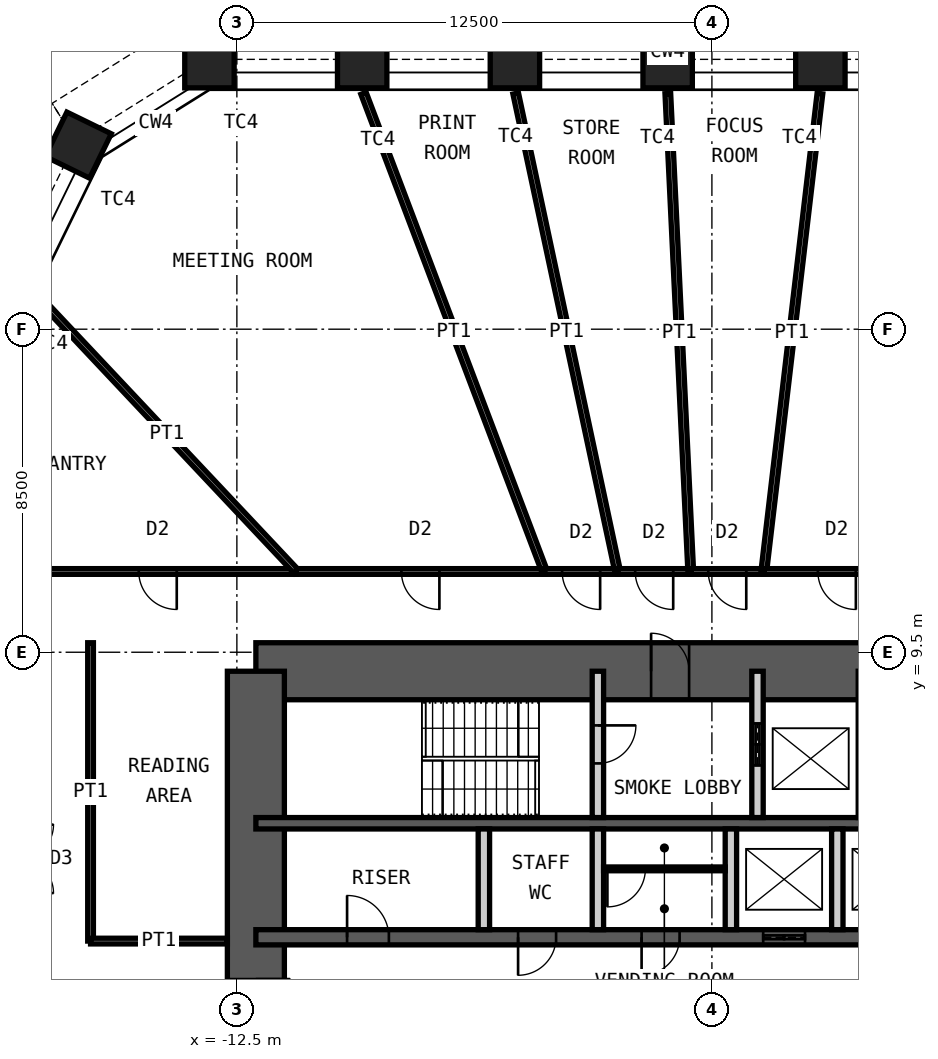
"""IFC4 building model, lengths in metres.
Left out: names, types, materials, properties, quantities, classifications, styles, units other than length and angle.
Written with IfcOpenShell. Run it as: python <this file> out.ifc"""

import sys

from ifc_helpers import new_model, si_unit, direction, frame, frame_2d, origin, origin_2d, place, context, subcontext, project, spatial, rectangle, hollow_rectangle, extrude, element, fill, save


model = new_model("IFC4")
c1 = context("Model", 3, precision=1e-05, world=origin(), true_north=direction((0.0, 1.0)))
c2 = subcontext(c1, "Body", "Model", "MODEL_VIEW")
j1 = project(units=[si_unit("LENGTHUNIT", "METRE"), si_unit("PLANEANGLEUNIT", "RADIAN")], contexts=[c1])
p1 = place(None, origin())
s1 = spatial("IfcSite", under=j1, at=p1, CompositionType="ELEMENT")
p2 = place(p1, origin())
s2 = spatial("IfcBuilding", under=s1, at=p2, CompositionType="ELEMENT")
p3 = place(p2, frame((0.0, 0.0, 140.8)))
s3 = spatial("IfcBuildingStorey", under=s2, at=p3, CompositionType="ELEMENT", Elevation=140.8)
for number, where, z_axis, x_axis in (
    (1, (-13.222, 25.0, 0.0), (0.0, 0.0, 1.0), (-1.0, 0.0, 0.0)),
    (2, (-9.203, 25.0, 0.0), (0.0, 0.0, 1.0), (-1.0, 0.0, 0.0)),
    (3, (-5.184, 25.0, 0.0), (0.0, 0.0, 1.0), (-1.0, 0.0, 0.0)),
    (4, (-1.165, 25.0, 0.0), (0.0, 0.0, 1.0), (-1.0, 0.0, 0.0)),
    (5, (2.854, 25.0, 0.0), (0.0, 0.0, 1.0), (-1.0, 0.0, 0.0)),
    (6, (-16.674, 22.843, 0.0), (0.0, 0.0, 1.0), (-0.438, -0.899, 0.0)),
):
    element("IfcColumn", number, at=place(p3, frame(where, z_axis=z_axis, x_axis=x_axis)), inside=s3, PredefinedType="COLUMN", context=c2, shape_type="SweptSolid", body=[
        extrude(hollow_rectangle(XDim=1.3, YDim=1.3, WallThickness=0.1, at=origin_2d()), origin(), (0.0, 0.0, 1.0), 4.2),
    ])
p4 = place(p3, frame((-12.0, 9.0, 0.0), z_axis=(0.0, 0.0, 1.0), x_axis=(1.0, 0.0, 0.0)))
e7 = element("IfcWall", 7, at=p4, inside=s3, PredefinedType="SHEAR", context=c2, shape_type="SweptSolid", body=[
    extrude(rectangle(XDim=24.0, YDim=1.5, at=frame_2d((12.0, 0.0))), origin(), (0.0, 0.0, 1.0), 4.2),
])
p5 = place(p4, frame((10.4, 0.0, 0.0)))
e8 = element("IfcOpeningElement", 8, at=p5, cuts=e7, PredefinedType="OPENING", context=c2, shape_type="SweptSolid", body=[
    extrude(rectangle(XDim=1.0, YDim=2.1, at=frame_2d((0.5, 1.05))), frame((0.0, 0.76, 0.0), z_axis=(0.0, -1.0, 0.0), x_axis=(1.0, 0.0, 0.0)), (0.0, 0.0, 1.0), 1.52),
])
p6 = place(p4, frame((17.6, 0.0, 0.0)))
e9 = element("IfcOpeningElement", 9, at=p6, cuts=e7, PredefinedType="OPENING", context=c2, shape_type="SweptSolid", body=[
    extrude(rectangle(XDim=0.9, YDim=2.1, at=frame_2d((0.45, 1.05))), frame((0.0, 0.76, 0.0), z_axis=(0.0, -1.0, 0.0), x_axis=(1.0, 0.0, 0.0)), (0.0, 0.0, 1.0), 1.52),
])
p7 = place(p4, frame((21.9, 0.0, 0.0)))
e10 = element("IfcOpeningElement", 10, at=p7, cuts=e7, PredefinedType="OPENING", context=c2, shape_type="SweptSolid", body=[
    extrude(rectangle(XDim=0.9, YDim=2.1, at=frame_2d((0.45, 1.05))), frame((0.0, 0.76, 0.0), z_axis=(0.0, -1.0, 0.0), x_axis=(1.0, 0.0, 0.0)), (0.0, 0.0, 1.0), 1.52),
])
p8 = place(p3, frame((-12.0, -9.0, 0.0), z_axis=(0.0, 0.0, 1.0), x_axis=(0.0, 1.0, 0.0)))
e11 = element("IfcWall", 11, at=p8, inside=s3, PredefinedType="SHEAR", context=c2, shape_type="SweptSolid", body=[
    extrude(rectangle(XDim=18.0, YDim=1.5, at=frame_2d((9.0, 0.0))), origin(), (0.0, 0.0, 1.0), 4.2),
])
p9 = place(p8, frame((8.1, 0.0, 0.0)))
e12 = element("IfcOpeningElement", 12, at=p9, cuts=e11, PredefinedType="OPENING", context=c2, shape_type="SweptSolid", body=[
    extrude(rectangle(XDim=1.8, YDim=2.1, at=frame_2d((0.9, 1.05))), frame((0.0, 0.76, 0.0), z_axis=(0.0, -1.0, 0.0), x_axis=(1.0, 0.0, 0.0)), (0.0, 0.0, 1.0), 1.52),
])
p10 = place(p3, frame((-12.0, 5.0, 0.0), z_axis=(0.0, 0.0, 1.0), x_axis=(1.0, 0.0, 0.0)))
e13 = element("IfcWall", 13, at=p10, inside=s3, PredefinedType="SHEAR", context=c2, shape_type="SweptSolid", body=[
    extrude(rectangle(XDim=24.0, YDim=0.3, at=frame_2d((12.0, 0.0))), origin(), (0.0, 0.0, 1.0), 4.2),
])
p11 = place(p3, frame((-12.0, 2.0, 0.0), z_axis=(0.0, 0.0, 1.0), x_axis=(1.0, 0.0, 0.0)))
e14 = element("IfcWall", 14, at=p11, inside=s3, PredefinedType="SHEAR", context=c2, shape_type="SweptSolid", body=[
    extrude(rectangle(XDim=24.0, YDim=0.4, at=frame_2d((12.0, 0.0))), origin(), (0.0, 0.0, 1.0), 4.2),
])
p12 = place(p11, frame((2.4, 0.0, 0.0)))
e15 = element("IfcOpeningElement", 15, at=p12, cuts=e14, PredefinedType="OPENING", context=c2, shape_type="SweptSolid", body=[
    extrude(rectangle(XDim=1.1, YDim=2.1, at=frame_2d((0.55, 1.05))), frame((0.0, 0.21, 0.0), z_axis=(0.0, -1.0, 0.0), x_axis=(1.0, 0.0, 0.0)), (0.0, 0.0, 1.0), 0.42),
])
p13 = place(p11, frame((22.0, 0.0, 0.0)))
e16 = element("IfcOpeningElement", 16, at=p13, cuts=e14, PredefinedType="OPENING", context=c2, shape_type="SweptSolid", body=[
    extrude(rectangle(XDim=1.1, YDim=2.1, at=frame_2d((0.55, 1.05))), frame((0.0, 0.21, 0.0), z_axis=(0.0, -1.0, 0.0), x_axis=(1.0, 0.0, 0.0)), (0.0, 0.0, 1.0), 0.42),
])
p14 = place(p11, frame((10.15, 0.0, 0.0)))
e17 = element("IfcOpeningElement", 17, at=p14, cuts=e14, PredefinedType="OPENING", context=c2, shape_type="SweptSolid", body=[
    extrude(rectangle(XDim=1.0, YDim=2.1, at=frame_2d((0.5, 1.05))), frame((0.0, 0.21, 0.0), z_axis=(0.0, -1.0, 0.0), x_axis=(1.0, 0.0, 0.0)), (0.0, 0.0, 1.0), 0.42),
])
p15 = place(p11, frame((6.9, 0.0, 0.0)))
e18 = element("IfcOpeningElement", 18, at=p15, cuts=e14, PredefinedType="OPENING", context=c2, shape_type="SweptSolid", body=[
    extrude(rectangle(XDim=1.0, YDim=2.1, at=frame_2d((0.5, 1.05))), frame((0.0, 0.21, 0.0), z_axis=(0.0, -1.0, 0.0), x_axis=(1.0, 0.0, 0.0)), (0.0, 0.0, 1.0), 0.42),
])
p16 = place(p11, frame((13.35, 0.0, 0.0)))
e19 = element("IfcOpeningElement", 19, at=p16, cuts=e14, PredefinedType="OPENING", context=c2, shape_type="SweptSolid", body=[
    extrude(rectangle(XDim=1.1, YDim=2.4, at=frame_2d((0.55, 1.2))), frame((0.0, 0.21, 0.0), z_axis=(0.0, -1.0, 0.0), x_axis=(1.0, 0.0, 0.0)), (0.0, 0.0, 1.0), 0.42),
])
p17 = place(p11, frame((16.15, 0.0, 0.0)))
e20 = element("IfcOpeningElement", 20, at=p17, cuts=e14, PredefinedType="OPENING", context=c2, shape_type="SweptSolid", body=[
    extrude(rectangle(XDim=1.1, YDim=2.4, at=frame_2d((0.55, 1.2))), frame((0.0, 0.21, 0.0), z_axis=(0.0, -1.0, 0.0), x_axis=(1.0, 0.0, 0.0)), (0.0, 0.0, 1.0), 0.42),
])
p18 = place(p11, frame((18.95, 0.0, 0.0)))
e21 = element("IfcOpeningElement", 21, at=p18, cuts=e14, PredefinedType="OPENING", context=c2, shape_type="SweptSolid", body=[
    extrude(rectangle(XDim=1.1, YDim=2.4, at=frame_2d((0.55, 1.2))), frame((0.0, 0.21, 0.0), z_axis=(0.0, -1.0, 0.0), x_axis=(1.0, 0.0, 0.0)), (0.0, 0.0, 1.0), 0.42),
])
p19 = place(p3, frame((-3.0, 5.15, 0.0), z_axis=(0.0, 0.0, 1.0), x_axis=(0.0, 1.0, 0.0)))
e22 = element("IfcWall", 22, at=p19, inside=s3, PredefinedType="PARTITIONING", context=c2, shape_type="SweptSolid", body=[
    extrude(rectangle(XDim=3.85, YDim=0.3, at=frame_2d((1.925, 0.0))), origin(), (0.0, 0.0, 1.0), 3.98),
])
p20 = place(p19, frame((1.425, 0.0, 0.0)))
e23 = element("IfcOpeningElement", 23, at=p20, cuts=e22, PredefinedType="OPENING", context=c2, shape_type="SweptSolid", body=[
    extrude(rectangle(XDim=1.0, YDim=2.1, at=frame_2d((0.5, 1.05))), frame((0.0, 0.16, 0.0), z_axis=(0.0, -1.0, 0.0), x_axis=(1.0, 0.0, 0.0)), (0.0, 0.0, 1.0), 0.32),
])
p21 = place(p3, frame((1.2, 5.15, 0.0), z_axis=(0.0, 0.0, 1.0), x_axis=(0.0, 1.0, 0.0)))
e24 = element("IfcWall", 24, at=p21, inside=s3, PredefinedType="PARTITIONING", context=c2, shape_type="SweptSolid", body=[
    extrude(rectangle(XDim=3.85, YDim=0.3, at=frame_2d((1.925, 0.0))), origin(), (0.0, 0.0, 1.0), 3.98),
])
p22 = place(p21, frame((1.375, 0.0, 0.0)))
e25 = element("IfcOpeningElement", 25, at=p22, cuts=e24, PredefinedType="OPENING", context=c2, shape_type="SweptSolid", body=[
    extrude(rectangle(XDim=1.1, YDim=2.4, at=frame_2d((0.55, 1.2))), frame((0.0, 0.16, 0.0), z_axis=(0.0, -1.0, 0.0), x_axis=(1.0, 0.0, 0.0)), (0.0, 0.0, 1.0), 0.32),
])
p23 = place(p3, frame((4.0, 5.15, 0.0), z_axis=(0.0, 0.0, 1.0), x_axis=(0.0, 1.0, 0.0)))
e26 = element("IfcWall", 26, at=p23, inside=s3, PredefinedType="PARTITIONING", context=c2, shape_type="SweptSolid", body=[
    extrude(rectangle(XDim=3.85, YDim=0.3, at=frame_2d((1.925, 0.0))), origin(), (0.0, 0.0, 1.0), 3.98),
])
for number, where, z_axis, x_axis in (
    (27, (-6.0, 2.2, 0.0), (0.0, 0.0, 1.0), (0.0, 1.0, 0.0)),
    (28, (-3.0, 2.2, 0.0), (0.0, 0.0, 1.0), (0.0, 1.0, 0.0)),
    (29, (0.5, 2.2, 0.0), (0.0, 0.0, 1.0), (0.0, 1.0, 0.0)),
    (30, (3.3, 2.2, 0.0), (0.0, 0.0, 1.0), (0.0, 1.0, 0.0)),
):
    element("IfcWall", number, at=place(p3, frame(where, z_axis=z_axis, x_axis=x_axis)), inside=s3, PredefinedType="PARTITIONING", context=c2, shape_type="SweptSolid", body=[
        extrude(rectangle(XDim=2.65, YDim=0.3, at=frame_2d((1.325, 0.0))), origin(), (0.0, 0.0, 1.0), 3.98),
    ])
p24 = place(p3, frame((-2.85, 3.8, 0.0), z_axis=(0.0, 0.0, 1.0), x_axis=(1.0, 0.0, 0.0)))
e31 = element("IfcWall", 31, at=p24, inside=s3, PredefinedType="PARTITIONING", context=c2, shape_type="SweptSolid", body=[
    extrude(rectangle(XDim=3.2, YDim=0.1, at=frame_2d((1.6, 0.0))), origin(), (0.0, 0.0, 1.0), 3.98),
])
p25 = place(p24, frame((0.1, 0.0, 0.0)))
e32 = element("IfcOpeningElement", 32, at=p25, cuts=e31, PredefinedType="OPENING", context=c2, shape_type="SweptSolid", body=[
    extrude(rectangle(XDim=1.0, YDim=2.4, at=frame_2d((0.5, 1.2))), frame((0.0, 0.06, 0.0), z_axis=(0.0, -1.0, 0.0), x_axis=(1.0, 0.0, 0.0)), (0.0, 0.0, 1.0), 0.12),
])
p26 = place(p3, frame((-18.225, 11.625, 0.0), z_axis=(0.0, 0.0, 1.0), x_axis=(1.0, 0.0, 0.0)))
e33 = element("IfcWall", 33, at=p26, inside=s3, PredefinedType="PARTITIONING", context=c2, shape_type="SweptSolid", body=[
    extrude(rectangle(XDim=7.286, YDim=0.15, at=frame_2d((3.643, 0.0))), origin(), (0.0, 0.0, 1.0), 4.03),
])
p27 = place(p26, frame((3.143, 0.0, 0.0)))
e34 = element("IfcOpeningElement", 34, at=p27, cuts=e33, PredefinedType="OPENING", context=c2, shape_type="SweptSolid", body=[
    extrude(rectangle(XDim=1.0, YDim=2.4, at=frame_2d((0.5, 1.2))), frame((0.0, 0.085, 0.0), z_axis=(0.0, -1.0, 0.0), x_axis=(1.0, 0.0, 0.0)), (0.0, 0.0, 1.0), 0.17),
])
p28 = place(p3, frame((-17.738, 18.851, 0.0), z_axis=(0.0, 0.0, 1.0), x_axis=(0.685286406267, -0.728273672039, 0.0)))
e35 = element("IfcWall", 35, at=p28, inside=s3, PredefinedType="PARTITIONING", context=c2, shape_type="SweptSolid", body=[
    extrude(rectangle(XDim=9.922, YDim=0.15, at=frame_2d((4.961, 0.0))), origin(), (0.0, 0.0, 1.0), 3.33),
])
p29 = place(p3, frame((-10.939, 11.625, 0.0), z_axis=(0.0, 0.0, 1.0), x_axis=(1.0, 0.0, 0.0)))
e36 = element("IfcWall", 36, at=p29, inside=s3, PredefinedType="PARTITIONING", context=c2, shape_type="SweptSolid", body=[
    extrude(rectangle(XDim=6.536, YDim=0.15, at=frame_2d((3.268, 0.0))), origin(), (0.0, 0.0, 1.0), 4.03),
])
p30 = place(p29, frame((2.768, 0.0, 0.0)))
e37 = element("IfcOpeningElement", 37, at=p30, cuts=e36, PredefinedType="OPENING", context=c2, shape_type="SweptSolid", body=[
    extrude(rectangle(XDim=1.0, YDim=2.4, at=frame_2d((0.5, 1.2))), frame((0.0, 0.085, 0.0), z_axis=(0.0, -1.0, 0.0), x_axis=(1.0, 0.0, 0.0)), (0.0, 0.0, 1.0), 0.17),
])
p31 = place(p3, frame((-9.167, 24.207, 0.0), z_axis=(0.0, 0.0, 1.0), x_axis=(0.354156368181, -0.935186220427, 0.0)))
e38 = element("IfcWall", 38, at=p31, inside=s3, PredefinedType="PARTITIONING", context=c2, shape_type="SweptSolid", body=[
    extrude(rectangle(XDim=13.454, YDim=0.15, at=frame_2d((6.727, 0.0))), origin(), (0.0, 0.0, 1.0), 3.33),
])
p32 = place(p3, frame((-4.403, 11.625, 0.0), z_axis=(0.0, 0.0, 1.0), x_axis=(1.0, 0.0, 0.0)))
e39 = element("IfcWall", 39, at=p32, inside=s3, PredefinedType="PARTITIONING", context=c2, shape_type="SweptSolid", body=[
    extrude(rectangle(XDim=1.923, YDim=0.15, at=frame_2d((0.961, 0.0))), origin(), (0.0, 0.0, 1.0), 4.03),
])
p33 = place(p32, frame((0.461, 0.0, 0.0)))
e40 = element("IfcOpeningElement", 40, at=p33, cuts=e39, PredefinedType="OPENING", context=c2, shape_type="SweptSolid", body=[
    extrude(rectangle(XDim=1.0, YDim=2.4, at=frame_2d((0.5, 1.2))), frame((0.0, 0.085, 0.0), z_axis=(0.0, -1.0, 0.0), x_axis=(1.0, 0.0, 0.0)), (0.0, 0.0, 1.0), 0.17),
])
p34 = place(p3, frame((-5.163, 24.202, 0.0), z_axis=(0.0, 0.0, 1.0), x_axis=(0.208618861146, -0.977997019819, 0.0)))
e41 = element("IfcWall", 41, at=p34, inside=s3, PredefinedType="PARTITIONING", context=c2, shape_type="SweptSolid", body=[
    extrude(rectangle(XDim=12.86, YDim=0.15, at=frame_2d((6.43, 0.0))), origin(), (0.0, 0.0, 1.0), 3.33),
])
p35 = place(p3, frame((-2.48, 11.625, 0.0), z_axis=(0.0, 0.0, 1.0), x_axis=(1.0, 0.0, 0.0)))
e42 = element("IfcWall", 42, at=p35, inside=s3, PredefinedType="PARTITIONING", context=c2, shape_type="SweptSolid", body=[
    extrude(rectangle(XDim=1.923, YDim=0.15, at=frame_2d((0.961, 0.0))), origin(), (0.0, 0.0, 1.0), 4.03),
])
p36 = place(p35, frame((0.461, 0.0, 0.0)))
e43 = element("IfcOpeningElement", 43, at=p36, cuts=e42, PredefinedType="OPENING", context=c2, shape_type="SweptSolid", body=[
    extrude(rectangle(XDim=1.0, YDim=2.4, at=frame_2d((0.5, 1.2))), frame((0.0, 0.085, 0.0), z_axis=(0.0, -1.0, 0.0), x_axis=(1.0, 0.0, 0.0)), (0.0, 0.0, 1.0), 0.17),
])
p37 = place(p3, frame((-1.16, 24.2, 0.0), z_axis=(0.0, 0.0, 1.0), x_axis=(0.047859979164, -0.998854054602, 0.0)))
e44 = element("IfcWall", 44, at=p37, inside=s3, PredefinedType="PARTITIONING", context=c2, shape_type="SweptSolid", body=[
    extrude(rectangle(XDim=12.59, YDim=0.15, at=frame_2d((6.295, 0.0))), origin(), (0.0, 0.0, 1.0), 3.33),
])
p38 = place(p3, frame((-0.557, 11.625, 0.0), z_axis=(0.0, 0.0, 1.0), x_axis=(1.0, 0.0, 0.0)))
e45 = element("IfcWall", 45, at=p38, inside=s3, PredefinedType="PARTITIONING", context=c2, shape_type="SweptSolid", body=[
    extrude(rectangle(XDim=1.923, YDim=0.15, at=frame_2d((0.961, 0.0))), origin(), (0.0, 0.0, 1.0), 4.03),
])
p39 = place(p38, frame((0.461, 0.0, 0.0)))
e46 = element("IfcOpeningElement", 46, at=p39, cuts=e45, PredefinedType="OPENING", context=c2, shape_type="SweptSolid", body=[
    extrude(rectangle(XDim=1.0, YDim=2.4, at=frame_2d((0.5, 1.2))), frame((0.0, 0.085, 0.0), z_axis=(0.0, -1.0, 0.0), x_axis=(1.0, 0.0, 0.0)), (0.0, 0.0, 1.0), 0.17),
])
p40 = place(p3, frame((2.843, 24.201, 0.0), z_axis=(0.0, 0.0, 1.0), x_axis=(-0.116670084723, -0.993170726175, 0.0)))
e47 = element("IfcWall", 47, at=p40, inside=s3, PredefinedType="PARTITIONING", context=c2, shape_type="SweptSolid", body=[
    extrude(rectangle(XDim=12.662, YDim=0.15, at=frame_2d((6.331, 0.0))), origin(), (0.0, 0.0, 1.0), 3.33),
])
p41 = place(p3, frame((1.366, 11.625, 0.0), z_axis=(0.0, 0.0, 1.0), x_axis=(1.0, 0.0, 0.0)))
e48 = element("IfcWall", 48, at=p41, inside=s3, PredefinedType="PARTITIONING", context=c2, shape_type="SweptSolid", body=[
    extrude(rectangle(XDim=3.845, YDim=0.15, at=frame_2d((1.923, 0.0))), origin(), (0.0, 0.0, 1.0), 4.03),
])
p42 = place(p41, frame((1.423, 0.0, 0.0)))
e49 = element("IfcOpeningElement", 49, at=p42, cuts=e48, PredefinedType="OPENING", context=c2, shape_type="SweptSolid", body=[
    extrude(rectangle(XDim=1.0, YDim=2.4, at=frame_2d((0.5, 1.2))), frame((0.0, 0.085, 0.0), z_axis=(0.0, -1.0, 0.0), x_axis=(1.0, 0.0, 0.0)), (0.0, 0.0, 1.0), 0.17),
])
p43 = place(p3, frame((-16.35, 1.9, 0.0), z_axis=(0.0, 0.0, 1.0), x_axis=(0.0, 1.0, 0.0)))
e50 = element("IfcWall", 50, at=p43, inside=s3, PredefinedType="PARTITIONING", context=c2, shape_type="SweptSolid", body=[
    extrude(rectangle(XDim=7.85, YDim=0.15, at=frame_2d((3.925, 0.0))), origin(), (0.0, 0.0, 1.0), 4.03),
])
p44 = place(p3, frame((-12.75, 1.9, 0.0), z_axis=(0.0, 0.0, 1.0), x_axis=(-1.0, 0.0, 0.0)))
e51 = element("IfcWall", 51, at=p44, inside=s3, PredefinedType="PARTITIONING", context=c2, shape_type="SweptSolid", body=[
    extrude(rectangle(XDim=3.6, YDim=0.15, at=frame_2d((1.8, 0.0))), origin(), (0.0, 0.0, 1.0), 3.33),
])
p45 = place(p5, origin())
e52 = element("IfcDoor", 52, at=p45, inside=s3, OperationType="SINGLE_SWING_RIGHT", PredefinedType="DOOR", context=c2, shape_type="SweptSolid", body=[
    extrude(rectangle(XDim=1.0, YDim=2.1, at=frame_2d((0.5, 1.05))), frame((0.0, 0.025, 0.0), z_axis=(0.0, -1.0, 0.0), x_axis=(1.0, 0.0, 0.0)), (0.0, 0.0, 1.0), 0.05),
])
fill(e8, e52)
p46 = place(p20, origin())
e53 = element("IfcDoor", 53, at=p46, inside=s3, OperationType="SINGLE_SWING_RIGHT", PredefinedType="DOOR", context=c2, shape_type="SweptSolid", body=[
    extrude(rectangle(XDim=1.0, YDim=2.1, at=frame_2d((0.5, 1.05))), frame((0.0, 0.025, 0.0), z_axis=(0.0, -1.0, 0.0), x_axis=(1.0, 0.0, 0.0)), (0.0, 0.0, 1.0), 0.05),
])
fill(e23, e53)
p47 = place(p12, origin())
e54 = element("IfcDoor", 54, at=p47, inside=s3, OperationType="SINGLE_SWING_RIGHT", PredefinedType="DOOR", context=c2, shape_type="SweptSolid", body=[
    extrude(rectangle(XDim=1.1, YDim=2.1, at=frame_2d((0.55, 1.05))), frame((0.0, 0.025, 0.0), z_axis=(0.0, -1.0, 0.0), x_axis=(1.0, 0.0, 0.0)), (0.0, 0.0, 1.0), 0.05),
])
fill(e15, e54)
p48 = place(p14, origin())
e55 = element("IfcDoor", 55, at=p48, inside=s3, OperationType="SINGLE_SWING_LEFT", PredefinedType="DOOR", context=c2, shape_type="SweptSolid", body=[
    extrude(rectangle(XDim=1.0, YDim=2.1, at=frame_2d((0.5, 1.05))), frame((0.0, 0.025, 0.0), z_axis=(0.0, -1.0, 0.0), x_axis=(1.0, 0.0, 0.0)), (0.0, 0.0, 1.0), 0.05),
])
fill(e17, e55)
p49 = place(p9, origin())
e56 = element("IfcDoor", 56, at=p49, inside=s3, OperationType="DOUBLE_DOOR_DOUBLE_SWING", PredefinedType="DOOR", context=c2, shape_type="SweptSolid", body=[
    extrude(rectangle(XDim=1.8, YDim=2.1, at=frame_2d((0.9, 1.05))), frame((0.0, 0.025, 0.0), z_axis=(0.0, -1.0, 0.0), x_axis=(1.0, 0.0, 0.0)), (0.0, 0.0, 1.0), 0.05),
])
fill(e12, e56)
p50 = place(p22, origin())
e57 = element("IfcDoor", 57, at=p50, inside=s3, OperationType="DOUBLE_DOOR_SLIDING", PredefinedType="DOOR", context=c2, shape_type="SweptSolid", body=[
    extrude(rectangle(XDim=1.1, YDim=2.4, at=frame_2d((0.55, 1.2))), frame((0.0, 0.025, 0.0), z_axis=(0.0, -1.0, 0.0), x_axis=(1.0, 0.0, 0.0)), (0.0, 0.0, 1.0), 0.05),
])
fill(e25, e57)
p51 = place(p15, origin())
e58 = element("IfcDoor", 58, at=p51, inside=s3, OperationType="SINGLE_SWING_LEFT", PredefinedType="DOOR", context=c2, shape_type="SweptSolid", body=[
    extrude(rectangle(XDim=1.0, YDim=2.1, at=frame_2d((0.5, 1.05))), frame((0.0, 0.025, 0.0), z_axis=(0.0, -1.0, 0.0), x_axis=(1.0, 0.0, 0.0)), (0.0, 0.0, 1.0), 0.05),
])
fill(e18, e58)
p52 = place(p16, origin())
e59 = element("IfcDoor", 59, at=p52, inside=s3, OperationType="DOUBLE_DOOR_SLIDING", PredefinedType="DOOR", context=c2, shape_type="SweptSolid", body=[
    extrude(rectangle(XDim=1.1, YDim=2.4, at=frame_2d((0.55, 1.2))), frame((0.0, 0.025, 0.0), z_axis=(0.0, -1.0, 0.0), x_axis=(1.0, 0.0, 0.0)), (0.0, 0.0, 1.0), 0.05),
])
fill(e19, e59)
p53 = place(p25, origin())
e60 = element("IfcDoor", 60, at=p53, inside=s3, OperationType="SINGLE_SWING_LEFT", PredefinedType="DOOR", context=c2, shape_type="SweptSolid", body=[
    extrude(rectangle(XDim=1.0, YDim=2.4, at=frame_2d((0.5, 1.2))), frame((0.0, 0.025, 0.0), z_axis=(0.0, -1.0, 0.0), x_axis=(1.0, 0.0, 0.0)), (0.0, 0.0, 1.0), 0.05),
])
fill(e32, e60)
p54 = place(p27, origin())
e61 = element("IfcDoor", 61, at=p54, inside=s3, OperationType="SINGLE_SWING_RIGHT", PredefinedType="DOOR", context=c2, shape_type="SweptSolid", body=[
    extrude(rectangle(XDim=1.0, YDim=2.4, at=frame_2d((0.5, 1.2))), frame((0.0, 0.025, 0.0), z_axis=(0.0, -1.0, 0.0), x_axis=(1.0, 0.0, 0.0)), (0.0, 0.0, 1.0), 0.05),
])
fill(e34, e61)
p55 = place(p30, origin())
e62 = element("IfcDoor", 62, at=p55, inside=s3, OperationType="SINGLE_SWING_RIGHT", PredefinedType="DOOR", context=c2, shape_type="SweptSolid", body=[
    extrude(rectangle(XDim=1.0, YDim=2.4, at=frame_2d((0.5, 1.2))), frame((0.0, 0.025, 0.0), z_axis=(0.0, -1.0, 0.0), x_axis=(1.0, 0.0, 0.0)), (0.0, 0.0, 1.0), 0.05),
])
fill(e37, e62)
p56 = place(p33, origin())
e63 = element("IfcDoor", 63, at=p56, inside=s3, OperationType="SINGLE_SWING_RIGHT", PredefinedType="DOOR", context=c2, shape_type="SweptSolid", body=[
    extrude(rectangle(XDim=1.0, YDim=2.4, at=frame_2d((0.5, 1.2))), frame((0.0, 0.025, 0.0), z_axis=(0.0, -1.0, 0.0), x_axis=(1.0, 0.0, 0.0)), (0.0, 0.0, 1.0), 0.05),
])
fill(e40, e63)
p57 = place(p36, origin())
e64 = element("IfcDoor", 64, at=p57, inside=s3, OperationType="SINGLE_SWING_RIGHT", PredefinedType="DOOR", context=c2, shape_type="SweptSolid", body=[
    extrude(rectangle(XDim=1.0, YDim=2.4, at=frame_2d((0.5, 1.2))), frame((0.0, 0.025, 0.0), z_axis=(0.0, -1.0, 0.0), x_axis=(1.0, 0.0, 0.0)), (0.0, 0.0, 1.0), 0.05),
])
fill(e43, e64)
p58 = place(p39, origin())
e65 = element("IfcDoor", 65, at=p58, inside=s3, OperationType="SINGLE_SWING_RIGHT", PredefinedType="DOOR", context=c2, shape_type="SweptSolid", body=[
    extrude(rectangle(XDim=1.0, YDim=2.4, at=frame_2d((0.5, 1.2))), frame((0.0, 0.025, 0.0), z_axis=(0.0, -1.0, 0.0), x_axis=(1.0, 0.0, 0.0)), (0.0, 0.0, 1.0), 0.05),
])
fill(e46, e65)
p59 = place(p42, origin())
e66 = element("IfcDoor", 66, at=p59, inside=s3, OperationType="SINGLE_SWING_RIGHT", PredefinedType="DOOR", context=c2, shape_type="SweptSolid", body=[
    extrude(rectangle(XDim=1.0, YDim=2.4, at=frame_2d((0.5, 1.2))), frame((0.0, 0.025, 0.0), z_axis=(0.0, -1.0, 0.0), x_axis=(1.0, 0.0, 0.0)), (0.0, 0.0, 1.0), 0.05),
])
fill(e49, e66)
save(model, sys.argv[1])
